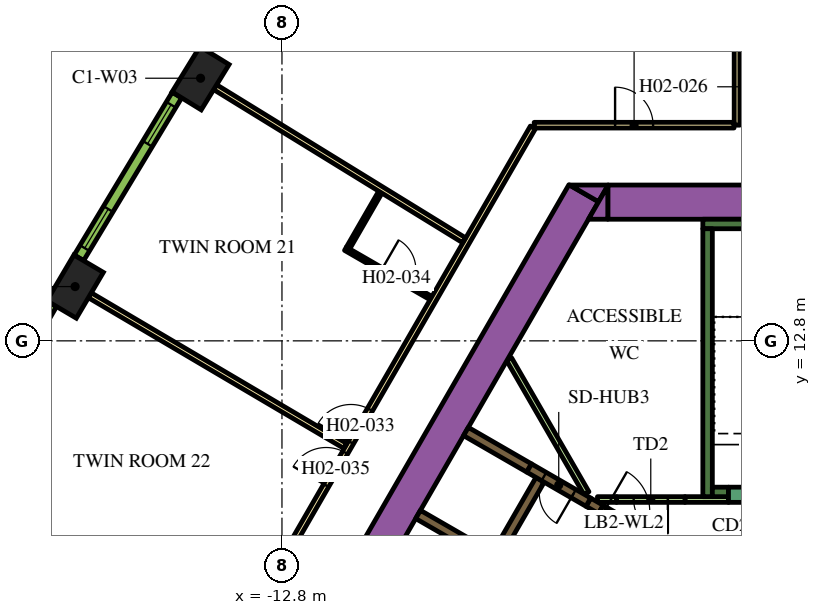
"""IFC4 building model, lengths in metres.
Left out: names, types, materials, properties, quantities, classifications, styles, units other than length and angle.
Written with IfcOpenShell. Run it as: python <this file> out.ifc"""

import sys

from ifc_helpers import new_model, si_unit, direction, frame, frame_2d, origin, origin_2d, place, context, subcontext, project, spatial, polyline, rectangle, outline, extrude, element, fill, save


model = new_model("IFC4")
c1 = context("Model", 3, precision=1e-05, world=origin(), true_north=direction((0.0, 1.0)))
c2 = subcontext(c1, "Body", "Model", "MODEL_VIEW")
j1 = project(units=[si_unit("LENGTHUNIT", "METRE"), si_unit("PLANEANGLEUNIT", "RADIAN")], contexts=[c1])
p1 = place(None, origin())
s1 = spatial("IfcSite", under=j1, at=p1, CompositionType="ELEMENT")
p2 = place(p1, origin())
s2 = spatial("IfcBuilding", under=s1, at=p2, CompositionType="ELEMENT")
p3 = place(p2, frame((0.0, 0.0, 43.2)))
s3 = spatial("IfcBuildingStorey", under=s2, at=p3, CompositionType="ELEMENT", Elevation=43.2)
for number, where, z_axis, x_axis in (
    (1, (-14.942, 19.71, 0.0), (0.0, 0.0, 1.0), (-0.524, -0.852, 0.0)),
    (2, (-18.243, 14.228, 0.0), (0.0, 0.0, 1.0), (-0.508, -0.861, 0.0)),
):
    element("IfcColumn", number, at=place(p3, frame(where, z_axis=z_axis, x_axis=x_axis)), inside=s3, PredefinedType="COLUMN", context=c2, shape_type="SweptSolid", body=[
        extrude(rectangle(XDim=1.4, YDim=0.9, at=origin_2d()), origin(), (0.0, 0.0, 1.0), 3.9),
    ])
p4 = place(p3, frame((-15.36, -1.503, 0.0), z_axis=(0.0, 0.0, 1.0), x_axis=(0.50000389221, 0.866023156604, 0.0)))
e3 = element("IfcWall", 3, at=p4, inside=s3, PredefinedType="SOLIDWALL", context=c2, shape_type="SweptSolid", body=[
    extrude(rectangle(XDim=21.0, YDim=0.9, at=frame_2d((10.5, 0.0))), origin(), (0.0, 0.0, 1.0), 3.9),
])
p5 = place(p3, origin())
e4 = element("IfcWall", 4, at=p5, inside=s3, PredefinedType="SOLIDWALL", context=c2, shape_type="SweptSolid", body=[
    extrude(outline(polyline([(-4.215, 16.9), (-4.469, 16.46), (-5.231, 16.9), (-4.215, 16.9)])), origin(), (0.0, 0.0, 1.0), 3.9),
])
p6 = place(p3, frame((-4.224, 16.45, 0.0), z_axis=(0.0, 0.0, 1.0), x_axis=(1.0, 0.0, 0.0)))
e5 = element("IfcWall", 5, at=p6, inside=s3, PredefinedType="SOLIDWALL", context=c2, shape_type="SweptSolid", body=[
    extrude(rectangle(XDim=9.488, YDim=0.9, at=frame_2d((4.744, 0.0))), origin(), (0.0, 0.0, 1.0), 3.9),
])
e6 = element("IfcWall", 6, at=p5, inside=s3, PredefinedType="SOLIDWALL", context=c2, shape_type="SweptSolid", body=[
    extrude(outline(polyline([(-4.734, 16.0), (-4.226, 16.88), (-4.226, 16.0), (-4.734, 16.0)])), origin(), (0.0, 0.0, 1.0), 3.9),
])
p7 = place(p3, frame((-1.725, 15.875, 0.0), z_axis=(0.0, 0.0, 1.0), x_axis=(1.0, 0.0, 0.0)))
e7 = element("IfcWall", 7, at=p7, inside=s3, PredefinedType="SOLIDWALL", context=c2, shape_type="SweptSolid", body=[
    extrude(rectangle(XDim=3.45, YDim=0.25, at=frame_2d((1.725, 0.0))), origin(), (0.0, 0.0, 1.0), 3.9),
])
p8 = place(p3, frame((-1.6, 8.7, 0.0), z_axis=(0.0, 0.0, 1.0), x_axis=(0.0, 1.0, 0.0)))
e8 = element("IfcWall", 8, at=p8, inside=s3, PredefinedType="SOLIDWALL", context=c2, shape_type="SweptSolid", body=[
    extrude(rectangle(XDim=7.05, YDim=0.25, at=frame_2d((3.525, 0.0))), origin(), (0.0, 0.0, 1.0), 3.9),
])
p9 = place(p3, frame((-1.475, 8.825, 0.0), z_axis=(0.0, 0.0, 1.0), x_axis=(1.0, 0.0, 0.0)))
e9 = element("IfcWall", 9, at=p9, inside=s3, PredefinedType="SOLIDWALL", context=c2, shape_type="SweptSolid", body=[
    extrude(rectangle(XDim=0.425, YDim=0.25, at=frame_2d((0.212, 0.0))), origin(), (0.0, 0.0, 1.0), 3.9),
])
e10 = element("IfcWall", 10, at=p5, inside=s3, PredefinedType="SOLIDWALL", context=c2, shape_type="SweptSolid", body=[
    extrude(outline(polyline([(-3.128, 7.481), (-3.259, 7.557), (-3.134, 7.773), (-3.003, 7.698), (-3.128, 7.481)])), origin(), (0.0, 0.0, 1.0), 3.9),
])
p10 = place(p3, frame((-7.314, 7.132, 0.0), z_axis=(0.0, 0.0, 1.0), x_axis=(-0.866008176907, 0.50002983664, 0.0)))
e11 = element("IfcWall", 11, at=p10, inside=s3, PredefinedType="SOLIDWALL", context=c2, shape_type="SweptSolid", body=[
    extrude(rectangle(XDim=2.2, YDim=0.25, at=frame_2d((1.1, 0.0))), origin(), (0.0, 0.0, 1.0), 3.9),
])
p11 = place(p3, frame((-6.296, 9.455, 0.0), z_axis=(0.0, 0.0, 1.0), x_axis=(-0.866011930837, 0.500023335103, 0.0)))
e12 = element("IfcWall", 12, at=p11, inside=s3, PredefinedType="SOLIDWALL", context=c2, shape_type="SweptSolid", body=[
    extrude(rectangle(XDim=1.92, YDim=0.25, at=frame_2d((0.96, 0.0))), origin(), (0.0, 0.0, 1.0), 3.9),
])
p12 = place(p3, frame((-4.409, 8.365, 0.0), z_axis=(0.0, 0.0, 1.0), x_axis=(-0.866057014183, 0.499945245186, 0.0)))
e13 = element("IfcWall", 13, at=p12, inside=s3, PredefinedType="SOLIDWALL", context=c2, shape_type="SweptSolid", body=[
    extrude(rectangle(XDim=0.379, YDim=0.25, at=frame_2d((0.19, 0.0))), origin(), (0.0, 0.0, 1.0), 3.9),
])
p13 = place(p3, frame((-2.195, 8.625, 0.0), z_axis=(0.0, 0.0, 1.0), x_axis=(1.0, 0.0, 0.0)))
e14 = element("IfcWall", 14, at=p13, inside=s3, PredefinedType="PARTITIONING", context=c2, shape_type="SweptSolid", body=[
    extrude(rectangle(XDim=1.145, YDim=0.15, at=frame_2d((0.573, 0.0))), origin(), (0.0, 0.0, 1.0), 2.75),
])
p14 = place(p3, frame((-6.823, 12.318, 0.0), z_axis=(0.0, 0.0, 1.0), x_axis=(0.500007885066, -0.866020851292, 0.0)))
e15 = element("IfcWall", 15, at=p14, inside=s3, PredefinedType="PARTITIONING", context=c2, shape_type="SweptSolid", body=[
    extrude(rectangle(XDim=4.072, YDim=0.15, at=frame_2d((2.036, 0.0))), origin(), (0.0, 0.0, 1.0), 2.75),
])
p15 = place(p3, frame((-4.498, 8.625, 0.0), z_axis=(0.0, 0.0, 1.0), x_axis=(1.0, 0.0, 0.0)))
e16 = element("IfcWall", 16, at=p15, inside=s3, PredefinedType="PARTITIONING", context=c2, shape_type="SweptSolid", body=[
    extrude(rectangle(XDim=0.502, YDim=0.15, at=frame_2d((0.251, 0.0))), origin(), (0.0, 0.0, 1.0), 2.75),
])
p16 = place(p3, frame((-6.008, 9.144, 0.0), z_axis=(0.0, 0.0, 1.0), x_axis=(-0.500006956611, -0.866021387346, 0.0)))
e17 = element("IfcWall", 17, at=p16, inside=s3, PredefinedType="SOLIDWALL", context=c2, shape_type="SweptSolid", body=[
    extrude(rectangle(XDim=9.83, YDim=0.25, at=frame_2d((4.915, 0.0))), origin(), (0.0, 0.0, 1.0), 3.9),
])
p17 = place(p16, frame((6.985, 0.0, 0.0)))
e18 = element("IfcOpeningElement", 18, at=p17, cuts=e17, PredefinedType="OPENING", context=c2, shape_type="SweptSolid", body=[
    extrude(rectangle(XDim=0.9, YDim=2.1, at=frame_2d((0.45, 1.05))), frame((0.0, 0.135, 0.0), z_axis=(0.0, -1.0, 0.0), x_axis=(1.0, 0.0, 0.0)), (0.0, 0.0, 1.0), 0.27),
])
p18 = place(p3, frame((1.05, 8.75, 0.0), z_axis=(0.0, 0.0, 1.0), x_axis=(-1.0, 0.0, 0.0)))
e19 = element("IfcWall", 19, at=p18, inside=s3, PredefinedType="SOLIDWALL", context=c2, shape_type="SweptSolid", body=[
    extrude(rectangle(XDim=2.1, YDim=0.4, at=frame_2d((1.05, 0.0))), origin(), (0.0, 0.0, 1.0), 3.9),
])
p19 = place(p18, frame((0.45, 0.0, 0.0)))
e20 = element("IfcOpeningElement", 20, at=p19, cuts=e19, PredefinedType="OPENING", context=c2, shape_type="SweptSolid", body=[
    extrude(rectangle(XDim=1.2, YDim=2.1, at=frame_2d((0.6, 1.05))), frame((0.0, 0.21, 0.0), z_axis=(0.0, -1.0, 0.0), x_axis=(1.0, 0.0, 0.0)), (0.0, 0.0, 1.0), 0.42),
])
p20 = place(p3, frame((-2.195, 8.625, 0.0), z_axis=(0.0, 0.0, 1.0), x_axis=(-1.0, 0.0, 0.0)))
e21 = element("IfcWall", 21, at=p20, inside=s3, PredefinedType="PARTITIONING", context=c2, shape_type="SweptSolid", body=[
    extrude(rectangle(XDim=1.8, YDim=0.15, at=frame_2d((0.9, 0.0))), origin(), (0.0, 0.0, 1.0), 2.75),
])
p21 = place(p20, frame((0.45, 0.0, 0.0)))
e22 = element("IfcOpeningElement", 22, at=p21, cuts=e21, PredefinedType="OPENING", context=c2, shape_type="SweptSolid", body=[
    extrude(rectangle(XDim=0.9, YDim=2.1, at=frame_2d((0.45, 1.05))), frame((0.0, 0.085, 0.0), z_axis=(0.0, -1.0, 0.0), x_axis=(1.0, 0.0, 0.0)), (0.0, 0.0, 1.0), 0.17),
])
p22 = place(p3, frame((-4.409, 8.365, 0.0), z_axis=(0.0, 0.0, 1.0), x_axis=(0.866034573852, -0.49998411664, 0.0)))
e23 = element("IfcWall", 23, at=p22, inside=s3, PredefinedType="SOLIDWALL", context=c2, shape_type="SweptSolid", body=[
    extrude(rectangle(XDim=1.4, YDim=0.25, at=frame_2d((0.7, 0.0))), origin(), (0.0, 0.0, 1.0), 3.9),
])
p23 = place(p22, frame((0.1, 0.0, 0.0)))
e24 = element("IfcOpeningElement", 24, at=p23, cuts=e23, PredefinedType="OPENING", context=c2, shape_type="SweptSolid", body=[
    extrude(rectangle(XDim=1.2, YDim=2.1, at=frame_2d((0.6, 1.05))), frame((0.0, 0.135, 0.0), z_axis=(0.0, -1.0, 0.0), x_axis=(1.0, 0.0, 0.0)), (0.0, 0.0, 1.0), 0.27),
])
p24 = place(p3, frame((-4.737, 8.555, 0.0), z_axis=(0.0, 0.0, 1.0), x_axis=(-0.865989075817, 0.500062916607, 0.0)))
e25 = element("IfcWall", 25, at=p24, inside=s3, PredefinedType="SOLIDWALL", context=c2, shape_type="SweptSolid", body=[
    extrude(rectangle(XDim=1.8, YDim=0.25, at=frame_2d((0.9, 0.0))), origin(), (0.0, 0.0, 1.0), 3.9),
])
p25 = place(p24, frame((0.45, 0.0, 0.0)))
e26 = element("IfcOpeningElement", 26, at=p25, cuts=e25, PredefinedType="OPENING", context=c2, shape_type="SweptSolid", body=[
    extrude(rectangle(XDim=0.9, YDim=2.1, at=frame_2d((0.45, 1.05))), frame((0.0, 0.135, 0.0), z_axis=(0.0, -1.0, 0.0), x_axis=(1.0, 0.0, 0.0)), (0.0, 0.0, 1.0), 0.27),
])
p26 = place(p3, frame((-0.825, 18.475, 0.0), z_axis=(0.0, 0.0, 1.0), x_axis=(0.0, 1.0, 0.0)))
e27 = element("IfcWall", 27, at=p26, inside=s3, PredefinedType="PARTITIONING", context=c2, shape_type="SweptSolid", body=[
    extrude(rectangle(XDim=16.224, YDim=0.15, at=frame_2d((8.112, 0.0))), origin(), (0.0, 0.0, 1.0), 2.75),
])
p27 = place(p26, frame((4.22, 0.0, 0.0)))
e28 = element("IfcOpeningElement", 28, at=p27, cuts=e27, PredefinedType="OPENING", context=c2, shape_type="SweptSolid", body=[
    extrude(rectangle(XDim=1.0, YDim=2.1, at=frame_2d((0.5, 1.05))), frame((0.0, 0.085, 0.0), z_axis=(0.0, -1.0, 0.0), x_axis=(1.0, 0.0, 0.0)), (0.0, 0.0, 1.0), 0.17),
])
p28 = place(p3, frame((-6.163, 18.475, 0.0), z_axis=(0.0, 0.0, 1.0), x_axis=(1.0, 0.0, 0.0)))
e29 = element("IfcWall", 29, at=p28, inside=s3, PredefinedType="PARTITIONING", context=c2, shape_type="SweptSolid", body=[
    extrude(rectangle(XDim=5.258, YDim=0.15, at=frame_2d((2.629, 0.0))), origin(), (0.0, 0.0, 1.0), 2.75),
])
p29 = place(p28, frame((2.129, 0.0, 0.0)))
e30 = element("IfcOpeningElement", 30, at=p29, cuts=e29, PredefinedType="OPENING", context=c2, shape_type="SweptSolid", body=[
    extrude(rectangle(XDim=1.0, YDim=2.1, at=frame_2d((0.5, 1.05))), frame((0.0, 0.085, 0.0), z_axis=(0.0, -1.0, 0.0), x_axis=(1.0, 0.0, 0.0)), (0.0, 0.0, 1.0), 0.17),
])
p30 = place(p3, frame((-19.081, -3.9, 0.0), z_axis=(0.0, 0.0, 1.0), x_axis=(0.499998313975, 0.866026377209, 0.0)))
e31 = element("IfcWall", 31, at=p30, inside=s3, PredefinedType="PARTITIONING", context=c2, shape_type="SweptSolid", body=[
    extrude(rectangle(XDim=25.766, YDim=0.15, at=frame_2d((12.883, 0.0))), origin(), (0.0, 0.0, 1.0), 2.75),
])
p31 = place(p30, frame((16.196, 0.0, 0.0)))
e32 = element("IfcOpeningElement", 32, at=p31, cuts=e31, PredefinedType="OPENING", context=c2, shape_type="SweptSolid", body=[
    extrude(rectangle(XDim=1.0, YDim=2.1, at=frame_2d((0.5, 1.05))), frame((0.0, 0.085, 0.0), z_axis=(0.0, -1.0, 0.0), x_axis=(1.0, 0.0, 0.0)), (0.0, 0.0, 1.0), 0.17),
])
p32 = place(p30, frame((14.889, 0.0, 0.0)))
e33 = element("IfcOpeningElement", 33, at=p32, cuts=e31, PredefinedType="OPENING", context=c2, shape_type="SweptSolid", body=[
    extrude(rectangle(XDim=1.0, YDim=2.1, at=frame_2d((0.5, 1.05))), frame((0.0, 0.085, 0.0), z_axis=(0.0, -1.0, 0.0), x_axis=(1.0, 0.0, 0.0)), (0.0, 0.0, 1.0), 0.17),
])
p33 = place(p30, frame((3.698, 0.0, 0.0)))
e34 = element("IfcOpeningElement", 34, at=p33, cuts=e31, PredefinedType="OPENING", context=c2, shape_type="SweptSolid", body=[
    extrude(rectangle(XDim=1.1, YDim=2.1, at=frame_2d((0.55, 1.05))), frame((0.0, 0.085, 0.0), z_axis=(0.0, -1.0, 0.0), x_axis=(1.0, 0.0, 0.0)), (0.0, 0.0, 1.0), 0.17),
])
p34 = place(p30, frame((2.392, 0.0, 0.0)))
e35 = element("IfcOpeningElement", 35, at=p34, cuts=e31, PredefinedType="OPENING", context=c2, shape_type="SweptSolid", body=[
    extrude(rectangle(XDim=1.0, YDim=2.1, at=frame_2d((0.5, 1.05))), frame((0.0, 0.085, 0.0), z_axis=(0.0, -1.0, 0.0), x_axis=(1.0, 0.0, 0.0)), (0.0, 0.0, 1.0), 0.17),
])
p35 = place(p3, frame((-21.052, 8.464, 0.0), z_axis=(0.0, 0.0, 1.0), x_axis=(0.87059371954, -0.492002617368, 0.0)))
e36 = element("IfcWall", 36, at=p35, inside=s3, PredefinedType="PARTITIONING", context=c2, shape_type="SweptSolid", body=[
    extrude(rectangle(XDim=7.803, YDim=0.15, at=frame_2d((3.902, 0.0))), origin(), (0.0, 0.0, 1.0), 2.75),
])
p36 = place(p3, frame((-17.856, 13.999, 0.0), z_axis=(0.0, 0.0, 1.0), x_axis=(0.861371519381, -0.507975497047, 0.0)))
e37 = element("IfcWall", 37, at=p36, inside=s3, PredefinedType="PARTITIONING", context=c2, shape_type="SweptSolid", body=[
    extrude(rectangle(XDim=7.804, YDim=0.15, at=frame_2d((3.902, 0.0))), origin(), (0.0, 0.0, 1.0), 2.75),
])
p37 = place(p3, frame((-14.558, 19.475, 0.0), z_axis=(0.0, 0.0, 1.0), x_axis=(0.851829455142, -0.523819223925, 0.0)))
e38 = element("IfcWall", 38, at=p37, inside=s3, PredefinedType="PARTITIONING", context=c2, shape_type="SweptSolid", body=[
    extrude(rectangle(XDim=7.688, YDim=0.15, at=frame_2d((3.844, 0.0))), origin(), (0.0, 0.0, 1.0), 2.75),
])
p38 = place(p3, frame((-11.129, 15.224, 0.0), z_axis=(0.0, 0.0, 1.0), x_axis=(0.866021400173, -0.500006934395, 0.0)))
e39 = element("IfcWall", 39, at=p38, inside=s3, PredefinedType="PARTITIONING", context=c2, shape_type="SweptSolid", body=[
    extrude(rectangle(XDim=2.6, YDim=0.1, at=frame_2d((1.3, 0.0))), origin(), (0.0, 0.0, 1.0), 2.75),
])
p39 = place(p38, frame((1.1, 0.0, 0.0)))
e40 = element("IfcOpeningElement", 40, at=p39, cuts=e39, PredefinedType="OPENING", context=c2, shape_type="SweptSolid", body=[
    extrude(rectangle(XDim=0.9, YDim=2.1, at=frame_2d((0.45, 1.05))), frame((0.0, 0.06, 0.0), z_axis=(0.0, -1.0, 0.0), x_axis=(1.0, 0.0, 0.0)), (0.0, 0.0, 1.0), 0.12),
])
p40 = place(p3, frame((-11.061, 15.242, 0.0), z_axis=(0.0, 0.0, 1.0), x_axis=(0.499976720371, 0.866038843867, 0.0)))
e41 = element("IfcWall", 41, at=p40, inside=s3, PredefinedType="PARTITIONING", context=c2, shape_type="SweptSolid", body=[
    extrude(rectangle(XDim=1.69, YDim=0.1, at=frame_2d((0.845, 0.0))), origin(), (0.0, 0.0, 1.0), 2.75),
])
p41 = place(p3, frame((-12.17, 24.699, 0.0), z_axis=(0.0, 0.0, 1.0), x_axis=(-0.531688286542, -0.846940119462, 0.0)))
e42 = element("IfcWall", 42, at=p41, inside=s3, PredefinedType="SOLIDWALL", context=c2, shape_type="SweptSolid", body=[
    extrude(rectangle(XDim=4.998, YDim=0.29, at=frame_2d((2.499, 0.0))), origin(), (0.0, 0.0, 1.0), 3.65),
])
p42 = place(p41, frame((0.297, 0.0, 0.9)))
e43 = element("IfcOpeningElement", 43, at=p42, cuts=e42, PredefinedType="OPENING", context=c2, shape_type="SweptSolid", body=[
    extrude(rectangle(XDim=1.2, YDim=2.15, at=frame_2d((0.6, 1.075))), frame((0.0, 0.155, 0.0), z_axis=(0.0, -1.0, 0.0), x_axis=(1.0, 0.0, 0.0)), (0.0, 0.0, 1.0), 0.31),
])
p43 = place(p41, frame((3.501, 0.0, 0.9)))
e44 = element("IfcOpeningElement", 44, at=p43, cuts=e42, PredefinedType="OPENING", context=c2, shape_type="SweptSolid", body=[
    extrude(rectangle(XDim=1.2, YDim=2.15, at=frame_2d((0.6, 1.075))), frame((0.0, 0.155, 0.0), z_axis=(0.0, -1.0, 0.0), x_axis=(1.0, 0.0, 0.0)), (0.0, 0.0, 1.0), 0.31),
])
p44 = place(p3, frame((-15.564, 19.267, 0.0), z_axis=(0.0, 0.0, 1.0), x_axis=(-0.515938796285, -0.856625448191, 0.0)))
e45 = element("IfcWall", 45, at=p44, inside=s3, PredefinedType="SOLIDWALL", context=c2, shape_type="SweptSolid", body=[
    extrude(rectangle(XDim=4.998, YDim=0.29, at=frame_2d((2.499, 0.0))), origin(), (0.0, 0.0, 1.0), 3.65),
])
p45 = place(p44, frame((0.297, 0.0, 0.9)))
e46 = element("IfcOpeningElement", 46, at=p45, cuts=e45, PredefinedType="OPENING", context=c2, shape_type="SweptSolid", body=[
    extrude(rectangle(XDim=1.2, YDim=2.15, at=frame_2d((0.6, 1.075))), frame((0.0, 0.155, 0.0), z_axis=(0.0, -1.0, 0.0), x_axis=(1.0, 0.0, 0.0)), (0.0, 0.0, 1.0), 0.31),
])
p46 = place(p44, frame((3.501, 0.0, 0.9)))
e47 = element("IfcOpeningElement", 47, at=p46, cuts=e45, PredefinedType="OPENING", context=c2, shape_type="SweptSolid", body=[
    extrude(rectangle(XDim=1.2, YDim=2.15, at=frame_2d((0.6, 1.075))), frame((0.0, 0.155, 0.0), z_axis=(0.0, -1.0, 0.0), x_axis=(1.0, 0.0, 0.0)), (0.0, 0.0, 1.0), 0.31),
])
p47 = place(p3, frame((-18.858, 13.773, 0.0), z_axis=(0.0, 0.0, 1.0), x_axis=(-0.50002123722, -0.866013142123, 0.0)))
e48 = element("IfcWall", 48, at=p47, inside=s3, PredefinedType="SOLIDWALL", context=c2, shape_type="SweptSolid", body=[
    extrude(rectangle(XDim=4.998, YDim=0.29, at=frame_2d((2.499, 0.0))), origin(), (0.0, 0.0, 1.0), 3.65),
])
p48 = place(p47, frame((0.297, 0.0, 0.9)))
e49 = element("IfcOpeningElement", 49, at=p48, cuts=e48, PredefinedType="OPENING", context=c2, shape_type="SweptSolid", body=[
    extrude(rectangle(XDim=1.2, YDim=2.15, at=frame_2d((0.6, 1.075))), frame((0.0, 0.155, 0.0), z_axis=(0.0, -1.0, 0.0), x_axis=(1.0, 0.0, 0.0)), (0.0, 0.0, 1.0), 0.31),
])
p49 = place(p47, frame((3.501, 0.0, 0.9)))
e50 = element("IfcOpeningElement", 50, at=p49, cuts=e48, PredefinedType="OPENING", context=c2, shape_type="SweptSolid", body=[
    extrude(rectangle(XDim=1.2, YDim=2.15, at=frame_2d((0.6, 1.075))), frame((0.0, 0.155, 0.0), z_axis=(0.0, -1.0, 0.0), x_axis=(1.0, 0.0, 0.0)), (0.0, 0.0, 1.0), 0.31),
])
p50 = place(p21, origin())
e51 = element("IfcDoor", 51, at=p50, inside=s3, OperationType="SINGLE_SWING_LEFT", PredefinedType="DOOR", context=c2, shape_type="SweptSolid", body=[
    extrude(rectangle(XDim=0.9, YDim=2.1, at=frame_2d((0.45, 1.05))), frame((0.0, 0.025, 0.0), z_axis=(0.0, -1.0, 0.0), x_axis=(1.0, 0.0, 0.0)), (0.0, 0.0, 1.0), 0.05),
])
fill(e22, e51)
p51 = place(p23, origin())
e52 = element("IfcDoor", 52, at=p51, inside=s3, OperationType="SINGLE_SWING_LEFT", PredefinedType="DOOR", context=c2, shape_type="SweptSolid", body=[
    extrude(rectangle(XDim=1.2, YDim=2.1, at=frame_2d((0.6, 1.05))), frame((0.0, 0.025, 0.0), z_axis=(0.0, -1.0, 0.0), x_axis=(1.0, 0.0, 0.0)), (0.0, 0.0, 1.0), 0.05),
])
fill(e24, e52)
p52 = place(p25, origin())
e53 = element("IfcDoor", 53, at=p52, inside=s3, OperationType="SINGLE_SWING_LEFT", PredefinedType="DOOR", context=c2, shape_type="SweptSolid", body=[
    extrude(rectangle(XDim=0.9, YDim=2.1, at=frame_2d((0.45, 1.05))), frame((0.0, 0.025, 0.0), z_axis=(0.0, -1.0, 0.0), x_axis=(1.0, 0.0, 0.0)), (0.0, 0.0, 1.0), 0.05),
])
fill(e26, e53)
p53 = place(p29, origin())
e54 = element("IfcDoor", 54, at=p53, inside=s3, OperationType="SINGLE_SWING_RIGHT", PredefinedType="DOOR", context=c2, shape_type="SweptSolid", body=[
    extrude(rectangle(XDim=1.0, YDim=2.1, at=frame_2d((0.5, 1.05))), frame((0.0, 0.025, 0.0), z_axis=(0.0, -1.0, 0.0), x_axis=(1.0, 0.0, 0.0)), (0.0, 0.0, 1.0), 0.05),
])
fill(e30, e54)
p54 = place(p31, origin())
e55 = element("IfcDoor", 55, at=p54, inside=s3, OperationType="SINGLE_SWING_LEFT", PredefinedType="DOOR", context=c2, shape_type="SweptSolid", body=[
    extrude(rectangle(XDim=1.0, YDim=2.1, at=frame_2d((0.5, 1.05))), frame((0.0, 0.025, 0.0), z_axis=(0.0, -1.0, 0.0), x_axis=(1.0, 0.0, 0.0)), (0.0, 0.0, 1.0), 0.05),
])
fill(e32, e55)
p55 = place(p39, origin())
e56 = element("IfcDoor", 56, at=p55, inside=s3, OperationType="SINGLE_SWING_RIGHT", PredefinedType="DOOR", context=c2, shape_type="SweptSolid", body=[
    extrude(rectangle(XDim=0.9, YDim=2.1, at=frame_2d((0.45, 1.05))), frame((0.0, 0.025, 0.0), z_axis=(0.0, -1.0, 0.0), x_axis=(1.0, 0.0, 0.0)), (0.0, 0.0, 1.0), 0.05),
])
fill(e40, e56)
p56 = place(p32, origin())
e57 = element("IfcDoor", 57, at=p56, inside=s3, OperationType="SINGLE_SWING_RIGHT", PredefinedType="DOOR", context=c2, shape_type="SweptSolid", body=[
    extrude(rectangle(XDim=1.0, YDim=2.1, at=frame_2d((0.5, 1.05))), frame((0.0, 0.025, 0.0), z_axis=(0.0, -1.0, 0.0), x_axis=(1.0, 0.0, 0.0)), (0.0, 0.0, 1.0), 0.05),
])
fill(e33, e57)
p57 = place(p45, origin())
e58 = element("IfcWindow", 58, at=p57, inside=s3, PartitioningType="DOUBLE_PANEL_VERTICAL", PredefinedType="WINDOW", context=c2, shape_type="SweptSolid", body=[
    extrude(rectangle(XDim=1.2, YDim=2.15, at=frame_2d((0.6, 1.075))), frame((0.0, 0.015, 0.0), z_axis=(0.0, -1.0, 0.0), x_axis=(1.0, 0.0, 0.0)), (0.0, 0.0, 1.0), 0.06),
])
fill(e46, e58)
p58 = place(p46, origin())
e59 = element("IfcWindow", 59, at=p58, inside=s3, PartitioningType="DOUBLE_PANEL_VERTICAL", PredefinedType="WINDOW", context=c2, shape_type="SweptSolid", body=[
    extrude(rectangle(XDim=1.2, YDim=2.15, at=frame_2d((0.6, 1.075))), frame((0.0, 0.015, 0.0), z_axis=(0.0, -1.0, 0.0), x_axis=(1.0, 0.0, 0.0)), (0.0, 0.0, 1.0), 0.06),
])
fill(e47, e59)
save(model, sys.argv[1])
